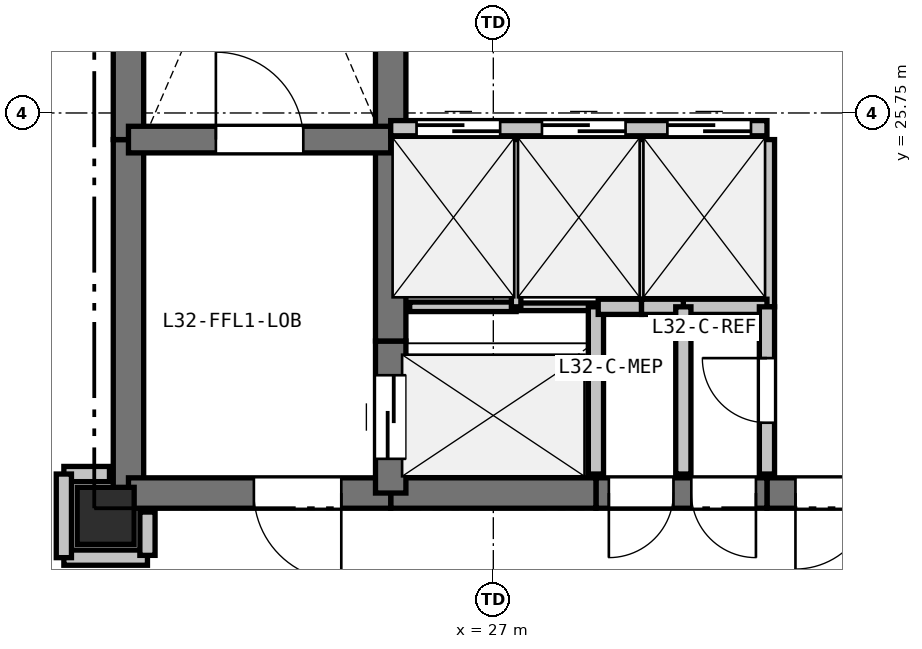
"""IFC4 building model, lengths in metres.
Left out: names, types, materials, properties, quantities, classifications, styles, units other than length and angle.
Written with IfcOpenShell. Run it as: python <this file> out.ifc"""

import sys

from ifc_helpers import new_model, si_unit, direction, frame, frame_2d, origin, origin_2d, place, context, subcontext, project, spatial, rectangle, extrude, element, fill, save


model = new_model("IFC4")
c1 = context("Model", 3, precision=1e-05, world=origin(), true_north=direction((0.0, 1.0)))
c2 = subcontext(c1, "Body", "Model", "MODEL_VIEW")
j1 = project(units=[si_unit("LENGTHUNIT", "METRE"), si_unit("PLANEANGLEUNIT", "RADIAN")], contexts=[c1])
p1 = place(None, origin())
s1 = spatial("IfcSite", under=j1, at=p1, CompositionType="ELEMENT")
p2 = place(p1, origin())
s2 = spatial("IfcBuilding", under=s1, at=p2, CompositionType="ELEMENT")
p3 = place(p2, frame((0.0, 0.0, 116.4)))
s3 = spatial("IfcBuildingStorey", under=s2, at=p3, CompositionType="ELEMENT", Elevation=116.4)
p4 = place(p3, frame((21.9, 20.45, 0.0), z_axis=(0.0, 0.0, 1.0), x_axis=(1.0, 0.0, 0.0)))
e1 = element("IfcColumn", 1, at=p4, inside=s3, PredefinedType="COLUMN", context=c2, shape_type="SweptSolid", body=[
    extrude(rectangle(XDim=0.75, YDim=0.75, at=origin_2d()), origin(), (0.0, 0.0, 1.0), 4.8),
])
p5 = place(p3, frame((22.2, 20.75, 0.0), z_axis=(0.0, 0.0, 1.0), x_axis=(0.0, 1.0, 0.0)))
e2 = element("IfcWall", 2, at=p5, inside=s3, PredefinedType="SHEAR", context=c2, shape_type="SweptSolid", body=[
    extrude(rectangle(XDim=4.65, YDim=0.4, at=frame_2d((2.325, 0.0))), origin(), (0.0, 0.0, 1.0), 4.56),
])
p6 = place(p3, frame((22.2, 25.4, 0.0), z_axis=(0.0, 0.0, 1.0), x_axis=(0.0, 1.0, 0.0)))
e3 = element("IfcWall", 3, at=p6, inside=s3, PredefinedType="SHEAR", context=c2, shape_type="SweptSolid", body=[
    extrude(rectangle(XDim=7.35, YDim=0.4, at=frame_2d((3.675, 0.0))), origin(), (0.0, 0.0, 1.0), 4.56),
])
p7 = place(p3, frame((32.35, 20.75, 0.0), z_axis=(0.0, 0.0, 1.0), x_axis=(-1.0, 0.0, 0.0)))
e4 = element("IfcWall", 4, at=p7, inside=s3, PredefinedType="SHEAR", context=c2, shape_type="SweptSolid", body=[
    extrude(rectangle(XDim=1.75, YDim=0.4, at=frame_2d((0.875, 0.0))), origin(), (0.0, 0.0, 1.0), 4.56),
])
p8 = place(p7, frame((0.375, 0.0, 0.0)))
e5 = element("IfcOpeningElement", 5, at=p8, cuts=e4, PredefinedType="OPENING", context=c2, shape_type="SweptSolid", body=[
    extrude(rectangle(XDim=1.0, YDim=2.15, at=frame_2d((0.5, 1.075))), frame((0.0, 0.21, 0.0), z_axis=(0.0, -1.0, 0.0), x_axis=(1.0, 0.0, 0.0)), (0.0, 0.0, 1.0), 0.42),
])
p9 = place(p3, frame((30.6, 20.75, 0.0), z_axis=(0.0, 0.0, 1.0), x_axis=(-1.0, 0.0, 0.0)))
e6 = element("IfcWall", 6, at=p9, inside=s3, PredefinedType="SHEAR", context=c2, shape_type="SweptSolid", body=[
    extrude(rectangle(XDim=2.25, YDim=0.4, at=frame_2d((1.125, 0.0))), origin(), (0.0, 0.0, 1.0), 4.56),
])
p10 = place(p9, frame((1.23, 0.0, 0.0)))
e7 = element("IfcOpeningElement", 7, at=p10, cuts=e6, PredefinedType="OPENING", context=c2, shape_type="SweptSolid", body=[
    extrude(rectangle(XDim=0.85, YDim=2.1, at=frame_2d((0.425, 1.05))), frame((0.0, 0.21, 0.0), z_axis=(0.0, -1.0, 0.0), x_axis=(1.0, 0.0, 0.0)), (0.0, 0.0, 1.0), 0.42),
])
p11 = place(p9, frame((0.145, 0.0, 0.0)))
e8 = element("IfcOpeningElement", 8, at=p11, cuts=e6, PredefinedType="OPENING", context=c2, shape_type="SweptSolid", body=[
    extrude(rectangle(XDim=0.85, YDim=2.1, at=frame_2d((0.425, 1.05))), frame((0.0, 0.21, 0.0), z_axis=(0.0, -1.0, 0.0), x_axis=(1.0, 0.0, 0.0)), (0.0, 0.0, 1.0), 0.42),
])
p12 = place(p3, frame((28.35, 20.75, 0.0), z_axis=(0.0, 0.0, 1.0), x_axis=(-1.0, 0.0, 0.0)))
e9 = element("IfcWall", 9, at=p12, inside=s3, PredefinedType="SHEAR", context=c2, shape_type="SweptSolid", body=[
    extrude(rectangle(XDim=2.7, YDim=0.4, at=frame_2d((1.35, 0.0))), origin(), (0.0, 0.0, 1.0), 4.56),
])
p13 = place(p3, frame((25.65, 20.75, 0.0), z_axis=(0.0, 0.0, 1.0), x_axis=(-1.0, 0.0, 0.0)))
e10 = element("IfcWall", 10, at=p13, inside=s3, PredefinedType="SHEAR", context=c2, shape_type="SweptSolid", body=[
    extrude(rectangle(XDim=3.45, YDim=0.4, at=frame_2d((1.725, 0.0))), origin(), (0.0, 0.0, 1.0), 4.56),
])
p14 = place(p13, frame((0.65, 0.0, 0.0)))
e11 = element("IfcOpeningElement", 11, at=p14, cuts=e10, PredefinedType="OPENING", context=c2, shape_type="SweptSolid", body=[
    extrude(rectangle(XDim=1.15, YDim=2.15, at=frame_2d((0.575, 1.075))), frame((0.0, 0.21, 0.0), z_axis=(0.0, -1.0, 0.0), x_axis=(1.0, 0.0, 0.0)), (0.0, 0.0, 1.0), 0.42),
])
p15 = place(p3, frame((25.65, 20.75, 0.0), z_axis=(0.0, 0.0, 1.0), x_axis=(0.0, 1.0, 0.0)))
e12 = element("IfcWall", 12, at=p15, inside=s3, PredefinedType="SHEAR", context=c2, shape_type="SweptSolid", body=[
    extrude(rectangle(XDim=2.0, YDim=0.4, at=frame_2d((1.0, 0.0))), origin(), (0.0, 0.0, 1.0), 4.56),
])
p16 = place(p15, frame((0.45, 0.0, 0.0)))
e13 = element("IfcOpeningElement", 13, at=p16, cuts=e12, PredefinedType="OPENING", context=c2, shape_type="SweptSolid", body=[
    extrude(rectangle(XDim=1.1, YDim=2.15, at=frame_2d((0.55, 1.075))), frame((0.0, 0.21, 0.0), z_axis=(0.0, -1.0, 0.0), x_axis=(1.0, 0.0, 0.0)), (0.0, 0.0, 1.0), 0.42),
])
p17 = place(p3, frame((25.65, 22.75, 0.0), z_axis=(0.0, 0.0, 1.0), x_axis=(0.0, 1.0, 0.0)))
e14 = element("IfcWall", 14, at=p17, inside=s3, PredefinedType="SHEAR", context=c2, shape_type="SweptSolid", body=[
    extrude(rectangle(XDim=2.8, YDim=0.4, at=frame_2d((1.4, 0.0))), origin(), (0.0, 0.0, 1.0), 4.56),
])
p18 = place(p3, frame((25.65, 25.55, 0.0), z_axis=(0.0, 0.0, 1.0), x_axis=(0.0, 1.0, 0.0)))
e15 = element("IfcWall", 15, at=p18, inside=s3, PredefinedType="SHEAR", context=c2, shape_type="SweptSolid", body=[
    extrude(rectangle(XDim=2.4, YDim=0.4, at=frame_2d((1.2, 0.0))), origin(), (0.0, 0.0, 1.0), 4.56),
])
p19 = place(p3, frame((22.2, 25.4, 0.0), z_axis=(0.0, 0.0, 1.0), x_axis=(1.0, 0.0, 0.0)))
e16 = element("IfcWall", 16, at=p19, inside=s3, PredefinedType="SHEAR", context=c2, shape_type="SweptSolid", body=[
    extrude(rectangle(XDim=3.45, YDim=0.35, at=frame_2d((1.725, 0.0))), origin(), (0.0, 0.0, 1.0), 4.56),
])
p20 = place(p19, frame((1.15, 0.0, 0.0)))
e17 = element("IfcOpeningElement", 17, at=p20, cuts=e16, PredefinedType="OPENING", context=c2, shape_type="SweptSolid", body=[
    extrude(rectangle(XDim=1.15, YDim=2.15, at=frame_2d((0.575, 1.075))), frame((0.0, 0.185, 0.0), z_axis=(0.0, -1.0, 0.0), x_axis=(1.0, 0.0, 0.0)), (0.0, 0.0, 1.0), 0.37),
])
p21 = place(p3, frame((25.65, 25.55, 0.0), z_axis=(0.0, 0.0, 1.0), x_axis=(1.0, 0.0, 0.0)))
e18 = element("IfcWall", 18, at=p21, inside=s3, PredefinedType="PARTITIONING", context=c2, shape_type="SweptSolid", body=[
    extrude(rectangle(XDim=4.95, YDim=0.2, at=frame_2d((2.475, 0.0))), origin(), (0.0, 0.0, 1.0), 4.56),
])
p22 = place(p21, frame((0.34, 0.0, 0.0)))
e19 = element("IfcOpeningElement", 19, at=p22, cuts=e18, PredefinedType="OPENING", context=c2, shape_type="SweptSolid", body=[
    extrude(rectangle(XDim=1.1, YDim=2.15, at=frame_2d((0.55, 1.075))), frame((0.0, 0.11, 0.0), z_axis=(0.0, -1.0, 0.0), x_axis=(1.0, 0.0, 0.0)), (0.0, 0.0, 1.0), 0.22),
])
p23 = place(p21, frame((1.99, 0.0, 0.0)))
e20 = element("IfcOpeningElement", 20, at=p23, cuts=e18, PredefinedType="OPENING", context=c2, shape_type="SweptSolid", body=[
    extrude(rectangle(XDim=1.1, YDim=2.15, at=frame_2d((0.55, 1.075))), frame((0.0, 0.11, 0.0), z_axis=(0.0, -1.0, 0.0), x_axis=(1.0, 0.0, 0.0)), (0.0, 0.0, 1.0), 0.22),
])
p24 = place(p21, frame((3.64, 0.0, 0.0)))
e21 = element("IfcOpeningElement", 21, at=p24, cuts=e18, PredefinedType="OPENING", context=c2, shape_type="SweptSolid", body=[
    extrude(rectangle(XDim=1.1, YDim=2.15, at=frame_2d((0.55, 1.075))), frame((0.0, 0.11, 0.0), z_axis=(0.0, -1.0, 0.0), x_axis=(1.0, 0.0, 0.0)), (0.0, 0.0, 1.0), 0.22),
])
p25 = place(p3, frame((25.9, 23.2, 0.0), z_axis=(0.0, 0.0, 1.0), x_axis=(1.0, 0.0, 0.0)))
e22 = element("IfcWall", 22, at=p25, inside=s3, PredefinedType="PARTITIONING", context=c2, shape_type="SweptSolid", body=[
    extrude(rectangle(XDim=1.4, YDim=0.125, at=frame_2d((0.7, 0.0))), origin(), (0.0, 0.0, 1.0), 4.56),
])
p26 = place(p3, frame((27.3, 23.2, 0.0), z_axis=(0.0, 0.0, 1.0), x_axis=(1.0, 0.0, 0.0)))
e23 = element("IfcWall", 23, at=p26, inside=s3, PredefinedType="PARTITIONING", context=c2, shape_type="SweptSolid", body=[
    extrude(rectangle(XDim=1.05, YDim=0.1, at=frame_2d((0.525, 0.0))), origin(), (0.0, 0.0, 1.0), 4.56),
])
p27 = place(p3, frame((28.35, 23.2, 0.0), z_axis=(0.0, 0.0, 1.0), x_axis=(0.0, -1.0, 0.0)))
e24 = element("IfcWall", 24, at=p27, inside=s3, PredefinedType="PARTITIONING", context=c2, shape_type="SweptSolid", body=[
    extrude(rectangle(XDim=2.2, YDim=0.2, at=frame_2d((1.1, 0.0))), origin(), (0.0, 0.0, 1.0), 4.56),
])
p28 = place(p3, frame((27.3, 25.4, 0.0), z_axis=(0.0, 0.0, 1.0), x_axis=(0.0, -1.0, 0.0)))
e25 = element("IfcWall", 25, at=p28, inside=s3, PredefinedType="PARTITIONING", context=c2, shape_type="SweptSolid", body=[
    extrude(rectangle(XDim=2.2, YDim=0.125, at=frame_2d((1.1, 0.0))), origin(), (0.0, 0.0, 1.0), 4.56),
])
p29 = place(p3, frame((28.95, 25.4, 0.0), z_axis=(0.0, 0.0, 1.0), x_axis=(0.0, -1.0, 0.0)))
e26 = element("IfcWall", 26, at=p29, inside=s3, PredefinedType="PARTITIONING", context=c2, shape_type="SweptSolid", body=[
    extrude(rectangle(XDim=2.2, YDim=0.1, at=frame_2d((1.1, 0.0))), origin(), (0.0, 0.0, 1.0), 4.56),
])
p30 = place(p3, frame((28.95, 23.2, 0.0), z_axis=(0.0, 0.0, 1.0), x_axis=(-1.0, 0.0, 0.0)))
e27 = element("IfcWall", 27, at=p30, inside=s3, PredefinedType="PARTITIONING", context=c2, shape_type="SweptSolid", body=[
    extrude(rectangle(XDim=0.57, YDim=0.2, at=frame_2d((0.285, 0.0))), origin(), (0.0, 0.0, 1.0), 4.56),
])
p31 = place(p3, frame((30.6, 25.4, 0.0), z_axis=(0.0, 0.0, 1.0), x_axis=(0.0, -1.0, 0.0)))
e28 = element("IfcWall", 28, at=p31, inside=s3, PredefinedType="PARTITIONING", context=c2, shape_type="SweptSolid", body=[
    extrude(rectangle(XDim=2.2, YDim=0.2, at=frame_2d((1.1, 0.0))), origin(), (0.0, 0.0, 1.0), 4.56),
])
p32 = place(p3, frame((30.6, 23.2, 0.0), z_axis=(0.0, 0.0, 1.0), x_axis=(-1.0, 0.0, 0.0)))
e29 = element("IfcWall", 29, at=p32, inside=s3, PredefinedType="PARTITIONING", context=c2, shape_type="SweptSolid", body=[
    extrude(rectangle(XDim=1.1, YDim=0.2, at=frame_2d((0.55, 0.0))), origin(), (0.0, 0.0, 1.0), 4.56),
])
p33 = place(p3, frame((29.5, 23.2, 0.0), z_axis=(0.0, 0.0, 1.0), x_axis=(-1.0, 0.0, 0.0)))
e30 = element("IfcWall", 30, at=p33, inside=s3, PredefinedType="PARTITIONING", context=c2, shape_type="SweptSolid", body=[
    extrude(rectangle(XDim=0.55, YDim=0.2, at=frame_2d((0.275, 0.0))), origin(), (0.0, 0.0, 1.0), 4.56),
])
p34 = place(p3, frame((30.6, 21.0, 0.0), z_axis=(0.0, 0.0, 1.0), x_axis=(0.0, 1.0, 0.0)))
e31 = element("IfcWall", 31, at=p34, inside=s3, PredefinedType="PARTITIONING", context=c2, shape_type="SweptSolid", body=[
    extrude(rectangle(XDim=2.2, YDim=0.2, at=frame_2d((1.1, 0.0))), origin(), (0.0, 0.0, 1.0), 4.56),
])
p35 = place(p34, frame((0.675, 0.0, 0.0)))
e32 = element("IfcOpeningElement", 32, at=p35, cuts=e31, PredefinedType="OPENING", context=c2, shape_type="SweptSolid", body=[
    extrude(rectangle(XDim=0.85, YDim=2.1, at=frame_2d((0.425, 1.05))), frame((0.0, 0.11, 0.0), z_axis=(0.0, -1.0, 0.0), x_axis=(1.0, 0.0, 0.0)), (0.0, 0.0, 1.0), 0.22),
])
p36 = place(p3, frame((21.35, 19.9, 0.0), z_axis=(0.0, 0.0, 1.0), x_axis=(1.0, 0.0, 0.0)))
e33 = element("IfcWall", 33, at=p36, inside=s3, PredefinedType="PARTITIONING", context=c2, shape_type="SweptSolid", body=[
    extrude(rectangle(XDim=1.1, YDim=0.2, at=frame_2d((0.55, 0.0))), origin(), (0.0, 0.0, 1.0), 4.56),
])
p37 = place(p3, frame((22.45, 19.93, 0.0), z_axis=(0.0, 0.0, 1.0), x_axis=(0.0, 1.0, 0.0)))
e34 = element("IfcWall", 34, at=p37, inside=s3, PredefinedType="PARTITIONING", context=c2, shape_type="SweptSolid", body=[
    extrude(rectangle(XDim=0.57, YDim=0.2, at=frame_2d((0.285, 0.0))), origin(), (0.0, 0.0, 1.0), 4.008),
])
p38 = place(p3, frame((21.95, 21.0, 0.0), z_axis=(0.0, 0.0, 1.0), x_axis=(-1.0, 0.0, 0.0)))
e35 = element("IfcWall", 35, at=p38, inside=s3, PredefinedType="PARTITIONING", context=c2, shape_type="SweptSolid", body=[
    extrude(rectangle(XDim=0.6, YDim=0.2, at=frame_2d((0.3, 0.0))), origin(), (0.0, 0.0, 1.0), 4.008),
])
p39 = place(p3, frame((21.35, 21.0, 0.0), z_axis=(0.0, 0.0, 1.0), x_axis=(0.0, -1.0, 0.0)))
e36 = element("IfcWall", 36, at=p39, inside=s3, PredefinedType="PARTITIONING", context=c2, shape_type="SweptSolid", body=[
    extrude(rectangle(XDim=1.1, YDim=0.2, at=frame_2d((0.55, 0.0))), origin(), (0.0, 0.0, 1.0), 4.56),
])
p40 = place(p3, frame((29.5, 23.2, 0.0), z_axis=(0.0, 0.0, 1.0), x_axis=(0.0, -1.0, 0.0)))
e37 = element("IfcWall", 37, at=p40, inside=s3, PredefinedType="PARTITIONING", context=c2, shape_type="SweptSolid", body=[
    extrude(rectangle(XDim=2.2, YDim=0.2, at=frame_2d((1.1, 0.0))), origin(), (0.0, 0.0, 1.0), 4.56),
])
p41 = place(p22, origin())
e38 = element("IfcDoor", 38, at=p41, inside=s3, OperationType="SLIDING_TO_LEFT", PredefinedType="DOOR", context=c2, shape_type="SweptSolid", body=[
    extrude(rectangle(XDim=1.1, YDim=2.15, at=frame_2d((0.55, 1.075))), frame((0.0, 0.025, 0.0), z_axis=(0.0, -1.0, 0.0), x_axis=(1.0, 0.0, 0.0)), (0.0, 0.0, 1.0), 0.05),
])
fill(e19, e38)
p42 = place(p23, origin())
e39 = element("IfcDoor", 39, at=p42, inside=s3, OperationType="SLIDING_TO_LEFT", PredefinedType="DOOR", context=c2, shape_type="SweptSolid", body=[
    extrude(rectangle(XDim=1.1, YDim=2.15, at=frame_2d((0.55, 1.075))), frame((0.0, 0.025, 0.0), z_axis=(0.0, -1.0, 0.0), x_axis=(1.0, 0.0, 0.0)), (0.0, 0.0, 1.0), 0.05),
])
fill(e20, e39)
p43 = place(p24, origin())
e40 = element("IfcDoor", 40, at=p43, inside=s3, OperationType="SLIDING_TO_LEFT", PredefinedType="DOOR", context=c2, shape_type="SweptSolid", body=[
    extrude(rectangle(XDim=1.1, YDim=2.15, at=frame_2d((0.55, 1.075))), frame((0.0, 0.025, 0.0), z_axis=(0.0, -1.0, 0.0), x_axis=(1.0, 0.0, 0.0)), (0.0, 0.0, 1.0), 0.05),
])
fill(e21, e40)
p44 = place(p8, origin())
e41 = element("IfcDoor", 41, at=p44, inside=s3, OperationType="SINGLE_SWING_RIGHT", PredefinedType="DOOR", context=c2, shape_type="SweptSolid", body=[
    extrude(rectangle(XDim=1.0, YDim=2.15, at=frame_2d((0.5, 1.075))), frame((0.0, 0.025, 0.0), z_axis=(0.0, -1.0, 0.0), x_axis=(1.0, 0.0, 0.0)), (0.0, 0.0, 1.0), 0.05),
])
fill(e5, e41)
p45 = place(p16, origin())
e42 = element("IfcDoor", 42, at=p45, inside=s3, OperationType="SLIDING_TO_LEFT", PredefinedType="DOOR", context=c2, shape_type="SweptSolid", body=[
    extrude(rectangle(XDim=1.1, YDim=2.15, at=frame_2d((0.55, 1.075))), frame((0.0, 0.025, 0.0), z_axis=(0.0, -1.0, 0.0), x_axis=(1.0, 0.0, 0.0)), (0.0, 0.0, 1.0), 0.05),
])
fill(e13, e42)
p46 = place(p20, origin())
e43 = element("IfcDoor", 43, at=p46, inside=s3, OperationType="SINGLE_SWING_LEFT", PredefinedType="DOOR", context=c2, shape_type="SweptSolid", body=[
    extrude(rectangle(XDim=1.15, YDim=2.15, at=frame_2d((0.575, 1.075))), frame((0.0, 0.025, 0.0), z_axis=(0.0, -1.0, 0.0), x_axis=(1.0, 0.0, 0.0)), (0.0, 0.0, 1.0), 0.05),
])
fill(e17, e43)
p47 = place(p14, origin())
e44 = element("IfcDoor", 44, at=p47, inside=s3, OperationType="SINGLE_SWING_LEFT", PredefinedType="DOOR", context=c2, shape_type="SweptSolid", body=[
    extrude(rectangle(XDim=1.15, YDim=2.15, at=frame_2d((0.575, 1.075))), frame((0.0, 0.025, 0.0), z_axis=(0.0, -1.0, 0.0), x_axis=(1.0, 0.0, 0.0)), (0.0, 0.0, 1.0), 0.05),
])
fill(e11, e44)
p48 = place(p35, origin())
e45 = element("IfcDoor", 45, at=p48, inside=s3, OperationType="SINGLE_SWING_RIGHT", PredefinedType="DOOR", context=c2, shape_type="SweptSolid", body=[
    extrude(rectangle(XDim=0.85, YDim=2.1, at=frame_2d((0.425, 1.05))), frame((0.0, 0.025, 0.0), z_axis=(0.0, -1.0, 0.0), x_axis=(1.0, 0.0, 0.0)), (0.0, 0.0, 1.0), 0.05),
])
fill(e32, e45)
p49 = place(p10, origin())
e46 = element("IfcDoor", 46, at=p49, inside=s3, OperationType="SINGLE_SWING_RIGHT", PredefinedType="DOOR", context=c2, shape_type="SweptSolid", body=[
    extrude(rectangle(XDim=0.85, YDim=2.1, at=frame_2d((0.425, 1.05))), frame((0.0, 0.025, 0.0), z_axis=(0.0, -1.0, 0.0), x_axis=(1.0, 0.0, 0.0)), (0.0, 0.0, 1.0), 0.05),
])
fill(e7, e46)
p50 = place(p11, origin())
e47 = element("IfcDoor", 47, at=p50, inside=s3, OperationType="SINGLE_SWING_LEFT", PredefinedType="DOOR", context=c2, shape_type="SweptSolid", body=[
    extrude(rectangle(XDim=0.85, YDim=2.1, at=frame_2d((0.425, 1.05))), frame((0.0, 0.025, 0.0), z_axis=(0.0, -1.0, 0.0), x_axis=(1.0, 0.0, 0.0)), (0.0, 0.0, 1.0), 0.05),
])
fill(e8, e47)
save(model, sys.argv[1])
